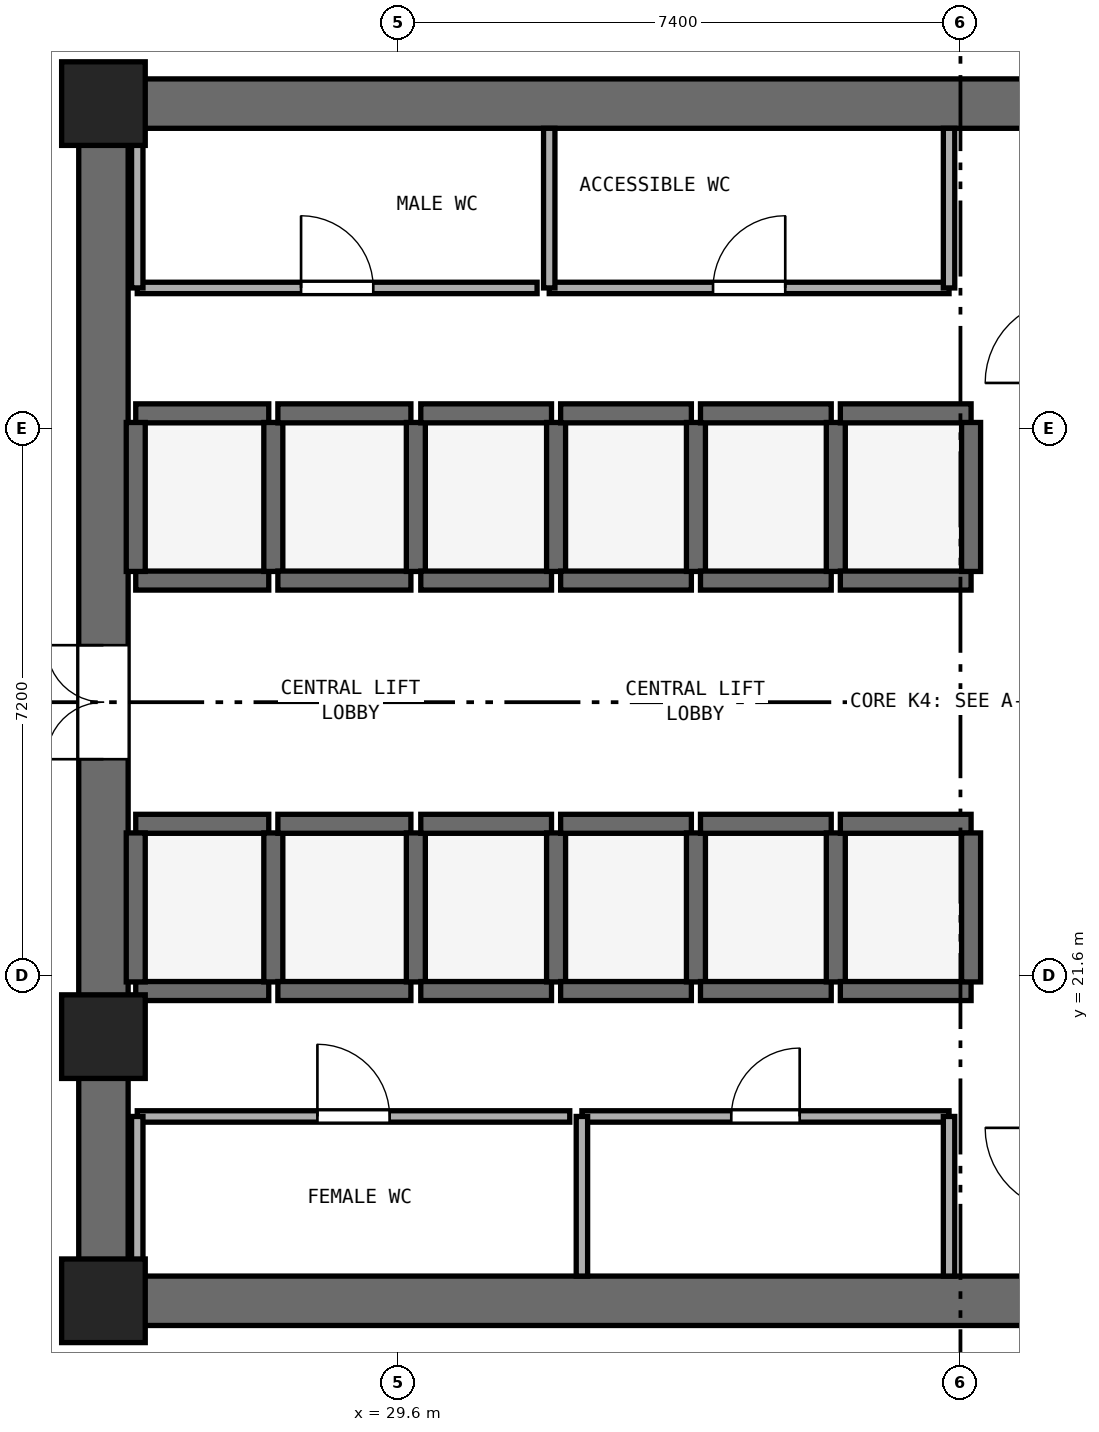
"""IFC4 building model, lengths in metres.
Left out: names, types, materials, properties, quantities, classifications, styles, units other than length and angle.
Written with IfcOpenShell. Run it as: python <this file> out.ifc"""

import sys

from ifc_helpers import new_model, si_unit, direction, frame, frame_2d, origin, origin_2d, place, context, subcontext, project, spatial, rectangle, extrude, element, fill, save


model = new_model("IFC4")
c1 = context("Model", 3, precision=1e-05, world=origin(), true_north=direction((0.0, 1.0)))
c2 = subcontext(c1, "Body", "Model", "MODEL_VIEW")
j1 = project(units=[si_unit("LENGTHUNIT", "METRE"), si_unit("PLANEANGLEUNIT", "RADIAN")], contexts=[c1])
p1 = place(None, origin())
s1 = spatial("IfcSite", under=j1, at=p1, CompositionType="ELEMENT")
p2 = place(p1, origin())
s2 = spatial("IfcBuilding", under=s1, at=p2, CompositionType="ELEMENT")
p3 = place(p2, frame((0.0, 0.0, 120.0)))
s3 = spatial("IfcBuildingStorey", under=s2, at=p3, CompositionType="ELEMENT", Elevation=120.0)
for number, where, z_axis, x_axis in (
    (1, (25.4, 17.325, 0.0), (0.0, 0.0, 1.0), (1.0, 0.0, 0.0)),
    (2, (25.4, 33.075, 0.0), (0.0, 0.0, 1.0), (1.0, 0.0, 0.0)),
):
    element("IfcWall", number, at=place(p3, frame(where, z_axis=z_axis, x_axis=x_axis)), inside=s3, PredefinedType="SHEAR", context=c2, shape_type="SweptSolid", body=[
        extrude(rectangle(XDim=23.2, YDim=0.65, at=frame_2d((11.6, 0.0))), origin(), (0.0, 0.0, 1.0), 4.6),
    ])
p4 = place(p3, frame((25.725, 17.65, 0.0), z_axis=(0.0, 0.0, 1.0), x_axis=(0.0, 1.0, 0.0)))
e3 = element("IfcWall", 3, at=p4, inside=s3, PredefinedType="SHEAR", context=c2, shape_type="SweptSolid", body=[
    extrude(rectangle(XDim=15.1, YDim=0.65, at=frame_2d((7.55, 0.0))), origin(), (0.0, 0.0, 1.0), 4.6),
])
p5 = place(p4, frame((6.8, 0.0, 0.0)))
e4 = element("IfcOpeningElement", 4, at=p5, cuts=e3, PredefinedType="OPENING", context=c2, shape_type="SweptSolid", body=[
    extrude(rectangle(XDim=1.5, YDim=2.15, at=frame_2d((0.75, 1.075))), frame((0.0, 0.335, 0.0), z_axis=(0.0, -1.0, 0.0), x_axis=(1.0, 0.0, 0.0)), (0.0, 0.0, 1.0), 0.67),
])
for number, where, z_axis, x_axis in (
    (5, (25.725, 17.325, 0.0), (0.0, 0.0, 1.0), (1.0, 0.0, 0.0)),
    (6, (25.725, 33.075, 0.0), (0.0, 0.0, 1.0), (1.0, 0.0, 0.0)),
    (7, (25.725, 20.8, 0.0), (0.0, 0.0, 1.0), (1.0, 0.0, 0.0)),
):
    element("IfcColumn", number, at=place(p3, frame(where, z_axis=z_axis, x_axis=x_axis)), inside=s3, PredefinedType="PILASTER", context=c2, shape_type="SweptSolid", body=[
        extrude(rectangle(XDim=1.1, YDim=1.1, at=origin_2d()), origin(), (0.0, 0.0, 1.0), 5.0),
    ])
for number, where, z_axis, x_axis in (
    (8, (26.15, 26.8, 0.0), (0.0, 0.0, 1.0), (1.0, 0.0, 0.0)),
    (9, (26.15, 29.0, 0.0), (0.0, 0.0, 1.0), (1.0, 0.0, 0.0)),
):
    element("IfcWall", number, at=place(p3, frame(where, z_axis=z_axis, x_axis=x_axis)), inside=s3, PredefinedType="SHEAR", context=c2, shape_type="SweptSolid", body=[
        extrude(rectangle(XDim=1.75, YDim=0.25, at=frame_2d((0.875, 0.0))), origin(), (0.0, 0.0, 1.0), 4.6),
    ])
for number, where, z_axis, x_axis in (
    (10, (26.15, 26.92, 0.0), (0.0, 0.0, 1.0), (0.0, 1.0, 0.0)),
    (11, (27.96, 26.92, 0.0), (0.0, 0.0, 1.0), (0.0, 1.0, 0.0)),
):
    element("IfcWall", number, at=place(p3, frame(where, z_axis=z_axis, x_axis=x_axis)), inside=s3, PredefinedType="SHEAR", context=c2, shape_type="SweptSolid", body=[
        extrude(rectangle(XDim=1.96, YDim=0.25, at=frame_2d((0.98, 0.0))), origin(), (0.0, 0.0, 1.0), 4.6),
    ])
for number, where, z_axis, x_axis in (
    (12, (28.02, 26.8, 0.0), (0.0, 0.0, 1.0), (1.0, 0.0, 0.0)),
    (13, (28.02, 29.0, 0.0), (0.0, 0.0, 1.0), (1.0, 0.0, 0.0)),
):
    element("IfcWall", number, at=place(p3, frame(where, z_axis=z_axis, x_axis=x_axis)), inside=s3, PredefinedType="SHEAR", context=c2, shape_type="SweptSolid", body=[
        extrude(rectangle(XDim=1.75, YDim=0.25, at=frame_2d((0.875, 0.0))), origin(), (0.0, 0.0, 1.0), 4.6),
    ])
p6 = place(p3, frame((29.835, 26.92, 0.0), z_axis=(0.0, 0.0, 1.0), x_axis=(0.0, 1.0, 0.0)))
e14 = element("IfcWall", 14, at=p6, inside=s3, PredefinedType="SHEAR", context=c2, shape_type="SweptSolid", body=[
    extrude(rectangle(XDim=1.96, YDim=0.25, at=frame_2d((0.98, 0.0))), origin(), (0.0, 0.0, 1.0), 4.6),
])
for number, where, z_axis, x_axis in (
    (15, (26.15, 21.4, 0.0), (0.0, 0.0, 1.0), (1.0, 0.0, 0.0)),
    (16, (26.15, 23.6, 0.0), (0.0, 0.0, 1.0), (1.0, 0.0, 0.0)),
):
    element("IfcWall", number, at=place(p3, frame(where, z_axis=z_axis, x_axis=x_axis)), inside=s3, PredefinedType="SHEAR", context=c2, shape_type="SweptSolid", body=[
        extrude(rectangle(XDim=1.75, YDim=0.25, at=frame_2d((0.875, 0.0))), origin(), (0.0, 0.0, 1.0), 4.6),
    ])
for number, where, z_axis, x_axis in (
    (17, (26.15, 21.52, 0.0), (0.0, 0.0, 1.0), (0.0, 1.0, 0.0)),
    (18, (27.96, 21.52, 0.0), (0.0, 0.0, 1.0), (0.0, 1.0, 0.0)),
):
    element("IfcWall", number, at=place(p3, frame(where, z_axis=z_axis, x_axis=x_axis)), inside=s3, PredefinedType="SHEAR", context=c2, shape_type="SweptSolid", body=[
        extrude(rectangle(XDim=1.96, YDim=0.25, at=frame_2d((0.98, 0.0))), origin(), (0.0, 0.0, 1.0), 4.6),
    ])
for number, where, z_axis, x_axis in (
    (19, (28.02, 21.4, 0.0), (0.0, 0.0, 1.0), (1.0, 0.0, 0.0)),
    (20, (28.02, 23.6, 0.0), (0.0, 0.0, 1.0), (1.0, 0.0, 0.0)),
):
    element("IfcWall", number, at=place(p3, frame(where, z_axis=z_axis, x_axis=x_axis)), inside=s3, PredefinedType="SHEAR", context=c2, shape_type="SweptSolid", body=[
        extrude(rectangle(XDim=1.75, YDim=0.25, at=frame_2d((0.875, 0.0))), origin(), (0.0, 0.0, 1.0), 4.6),
    ])
p7 = place(p3, frame((29.835, 21.52, 0.0), z_axis=(0.0, 0.0, 1.0), x_axis=(0.0, 1.0, 0.0)))
e21 = element("IfcWall", 21, at=p7, inside=s3, PredefinedType="SHEAR", context=c2, shape_type="SweptSolid", body=[
    extrude(rectangle(XDim=1.96, YDim=0.25, at=frame_2d((0.98, 0.0))), origin(), (0.0, 0.0, 1.0), 4.6),
])
for number, where, z_axis, x_axis in (
    (22, (29.9, 21.4, 0.0), (0.0, 0.0, 1.0), (1.0, 0.0, 0.0)),
    (23, (29.9, 23.6, 0.0), (0.0, 0.0, 1.0), (1.0, 0.0, 0.0)),
):
    element("IfcWall", number, at=place(p3, frame(where, z_axis=z_axis, x_axis=x_axis)), inside=s3, PredefinedType="SHEAR", context=c2, shape_type="SweptSolid", body=[
        extrude(rectangle(XDim=1.72, YDim=0.25, at=frame_2d((0.86, 0.0))), origin(), (0.0, 0.0, 1.0), 4.6),
    ])
p8 = place(p3, frame((31.68, 21.52, 0.0), z_axis=(0.0, 0.0, 1.0), x_axis=(0.0, 1.0, 0.0)))
e24 = element("IfcWall", 24, at=p8, inside=s3, PredefinedType="SHEAR", context=c2, shape_type="SweptSolid", body=[
    extrude(rectangle(XDim=1.96, YDim=0.25, at=frame_2d((0.98, 0.0))), origin(), (0.0, 0.0, 1.0), 4.6),
])
for number, where, z_axis, x_axis in (
    (25, (31.74, 21.4, 0.0), (0.0, 0.0, 1.0), (1.0, 0.0, 0.0)),
    (26, (31.74, 23.6, 0.0), (0.0, 0.0, 1.0), (1.0, 0.0, 0.0)),
):
    element("IfcWall", number, at=place(p3, frame(where, z_axis=z_axis, x_axis=x_axis)), inside=s3, PredefinedType="SHEAR", context=c2, shape_type="SweptSolid", body=[
        extrude(rectangle(XDim=1.72, YDim=0.25, at=frame_2d((0.86, 0.0))), origin(), (0.0, 0.0, 1.0), 4.6),
    ])
p9 = place(p3, frame((33.52, 21.52, 0.0), z_axis=(0.0, 0.0, 1.0), x_axis=(0.0, 1.0, 0.0)))
e27 = element("IfcWall", 27, at=p9, inside=s3, PredefinedType="SHEAR", context=c2, shape_type="SweptSolid", body=[
    extrude(rectangle(XDim=1.96, YDim=0.25, at=frame_2d((0.98, 0.0))), origin(), (0.0, 0.0, 1.0), 4.6),
])
for number, where, z_axis, x_axis in (
    (28, (33.58, 21.4, 0.0), (0.0, 0.0, 1.0), (1.0, 0.0, 0.0)),
    (29, (33.58, 23.6, 0.0), (0.0, 0.0, 1.0), (1.0, 0.0, 0.0)),
):
    element("IfcWall", number, at=place(p3, frame(where, z_axis=z_axis, x_axis=x_axis)), inside=s3, PredefinedType="SHEAR", context=c2, shape_type="SweptSolid", body=[
        extrude(rectangle(XDim=1.72, YDim=0.25, at=frame_2d((0.86, 0.0))), origin(), (0.0, 0.0, 1.0), 4.6),
    ])
p10 = place(p3, frame((35.36, 21.52, 0.0), z_axis=(0.0, 0.0, 1.0), x_axis=(0.0, 1.0, 0.0)))
e30 = element("IfcWall", 30, at=p10, inside=s3, PredefinedType="SHEAR", context=c2, shape_type="SweptSolid", body=[
    extrude(rectangle(XDim=1.96, YDim=0.25, at=frame_2d((0.98, 0.0))), origin(), (0.0, 0.0, 1.0), 4.6),
])
for number, where, z_axis, x_axis in (
    (31, (35.42, 21.4, 0.0), (0.0, 0.0, 1.0), (1.0, 0.0, 0.0)),
    (32, (35.42, 23.6, 0.0), (0.0, 0.0, 1.0), (1.0, 0.0, 0.0)),
):
    element("IfcWall", number, at=place(p3, frame(where, z_axis=z_axis, x_axis=x_axis)), inside=s3, PredefinedType="SHEAR", context=c2, shape_type="SweptSolid", body=[
        extrude(rectangle(XDim=1.72, YDim=0.25, at=frame_2d((0.86, 0.0))), origin(), (0.0, 0.0, 1.0), 4.6),
    ])
p11 = place(p3, frame((37.14, 21.52, 0.0), z_axis=(0.0, 0.0, 1.0), x_axis=(0.0, 1.0, 0.0)))
e33 = element("IfcWall", 33, at=p11, inside=s3, PredefinedType="SHEAR", context=c2, shape_type="SweptSolid", body=[
    extrude(rectangle(XDim=1.96, YDim=0.25, at=frame_2d((0.98, 0.0))), origin(), (0.0, 0.0, 1.0), 4.6),
])
for number, where, z_axis, x_axis in (
    (34, (29.9, 26.8, 0.0), (0.0, 0.0, 1.0), (1.0, 0.0, 0.0)),
    (35, (29.9, 29.0, 0.0), (0.0, 0.0, 1.0), (1.0, 0.0, 0.0)),
):
    element("IfcWall", number, at=place(p3, frame(where, z_axis=z_axis, x_axis=x_axis)), inside=s3, PredefinedType="SHEAR", context=c2, shape_type="SweptSolid", body=[
        extrude(rectangle(XDim=1.72, YDim=0.25, at=frame_2d((0.86, 0.0))), origin(), (0.0, 0.0, 1.0), 4.6),
    ])
p12 = place(p3, frame((31.68, 26.92, 0.0), z_axis=(0.0, 0.0, 1.0), x_axis=(0.0, 1.0, 0.0)))
e36 = element("IfcWall", 36, at=p12, inside=s3, PredefinedType="SHEAR", context=c2, shape_type="SweptSolid", body=[
    extrude(rectangle(XDim=1.96, YDim=0.25, at=frame_2d((0.98, 0.0))), origin(), (0.0, 0.0, 1.0), 4.6),
])
for number, where, z_axis, x_axis in (
    (37, (31.74, 26.8, 0.0), (0.0, 0.0, 1.0), (1.0, 0.0, 0.0)),
    (38, (31.74, 29.0, 0.0), (0.0, 0.0, 1.0), (1.0, 0.0, 0.0)),
):
    element("IfcWall", number, at=place(p3, frame(where, z_axis=z_axis, x_axis=x_axis)), inside=s3, PredefinedType="SHEAR", context=c2, shape_type="SweptSolid", body=[
        extrude(rectangle(XDim=1.72, YDim=0.25, at=frame_2d((0.86, 0.0))), origin(), (0.0, 0.0, 1.0), 4.6),
    ])
p13 = place(p3, frame((33.52, 26.92, 0.0), z_axis=(0.0, 0.0, 1.0), x_axis=(0.0, 1.0, 0.0)))
e39 = element("IfcWall", 39, at=p13, inside=s3, PredefinedType="SHEAR", context=c2, shape_type="SweptSolid", body=[
    extrude(rectangle(XDim=1.96, YDim=0.25, at=frame_2d((0.98, 0.0))), origin(), (0.0, 0.0, 1.0), 4.6),
])
for number, where, z_axis, x_axis in (
    (40, (33.58, 26.8, 0.0), (0.0, 0.0, 1.0), (1.0, 0.0, 0.0)),
    (41, (33.58, 29.0, 0.0), (0.0, 0.0, 1.0), (1.0, 0.0, 0.0)),
):
    element("IfcWall", number, at=place(p3, frame(where, z_axis=z_axis, x_axis=x_axis)), inside=s3, PredefinedType="SHEAR", context=c2, shape_type="SweptSolid", body=[
        extrude(rectangle(XDim=1.72, YDim=0.25, at=frame_2d((0.86, 0.0))), origin(), (0.0, 0.0, 1.0), 4.6),
    ])
p14 = place(p3, frame((35.36, 26.92, 0.0), z_axis=(0.0, 0.0, 1.0), x_axis=(0.0, 1.0, 0.0)))
e42 = element("IfcWall", 42, at=p14, inside=s3, PredefinedType="SHEAR", context=c2, shape_type="SweptSolid", body=[
    extrude(rectangle(XDim=1.96, YDim=0.25, at=frame_2d((0.98, 0.0))), origin(), (0.0, 0.0, 1.0), 4.6),
])
for number, where, z_axis, x_axis in (
    (43, (35.42, 26.8, 0.0), (0.0, 0.0, 1.0), (1.0, 0.0, 0.0)),
    (44, (35.42, 29.0, 0.0), (0.0, 0.0, 1.0), (1.0, 0.0, 0.0)),
):
    element("IfcWall", number, at=place(p3, frame(where, z_axis=z_axis, x_axis=x_axis)), inside=s3, PredefinedType="SHEAR", context=c2, shape_type="SweptSolid", body=[
        extrude(rectangle(XDim=1.72, YDim=0.25, at=frame_2d((0.86, 0.0))), origin(), (0.0, 0.0, 1.0), 4.6),
    ])
p15 = place(p3, frame((37.14, 26.92, 0.0), z_axis=(0.0, 0.0, 1.0), x_axis=(0.0, 1.0, 0.0)))
e45 = element("IfcWall", 45, at=p15, inside=s3, PredefinedType="SHEAR", context=c2, shape_type="SweptSolid", body=[
    extrude(rectangle(XDim=1.96, YDim=0.25, at=frame_2d((0.98, 0.0))), origin(), (0.0, 0.0, 1.0), 4.6),
])
p16 = place(p3, frame((26.17, 30.65, 0.0), z_axis=(0.0, 0.0, 1.0), x_axis=(1.0, 0.0, 0.0)))
e46 = element("IfcWall", 46, at=p16, inside=s3, PredefinedType="PARTITIONING", context=c2, shape_type="SweptSolid", body=[
    extrude(rectangle(XDim=5.26, YDim=0.15, at=frame_2d((2.63, 0.0))), origin(), (0.0, 0.0, 1.0), 4.6),
])
p17 = place(p16, frame((2.155, 0.0, 0.0)))
e47 = element("IfcOpeningElement", 47, at=p17, cuts=e46, PredefinedType="OPENING", context=c2, shape_type="SweptSolid", body=[
    extrude(rectangle(XDim=0.95, YDim=2.1, at=frame_2d((0.475, 1.05))), frame((0.0, 0.085, 0.0), z_axis=(0.0, -1.0, 0.0), x_axis=(1.0, 0.0, 0.0)), (0.0, 0.0, 1.0), 0.17),
])
p18 = place(p3, frame((26.17, 30.65, 0.0), z_axis=(0.0, 0.0, 1.0), x_axis=(0.0, 1.0, 0.0)))
e48 = element("IfcWall", 48, at=p18, inside=s3, PredefinedType="PARTITIONING", context=c2, shape_type="SweptSolid", body=[
    extrude(rectangle(XDim=2.1, YDim=0.15, at=frame_2d((1.05, 0.0))), origin(), (0.0, 0.0, 1.0), 4.6),
])
p19 = place(p3, frame((31.59, 30.65, 0.0), z_axis=(0.0, 0.0, 1.0), x_axis=(1.0, 0.0, 0.0)))
e49 = element("IfcWall", 49, at=p19, inside=s3, PredefinedType="PARTITIONING", context=c2, shape_type="SweptSolid", body=[
    extrude(rectangle(XDim=5.26, YDim=0.15, at=frame_2d((2.63, 0.0))), origin(), (0.0, 0.0, 1.0), 4.6),
])
p20 = place(p19, frame((2.155, 0.0, 0.0)))
e50 = element("IfcOpeningElement", 50, at=p20, cuts=e49, PredefinedType="OPENING", context=c2, shape_type="SweptSolid", body=[
    extrude(rectangle(XDim=0.95, YDim=2.1, at=frame_2d((0.475, 1.05))), frame((0.0, 0.085, 0.0), z_axis=(0.0, -1.0, 0.0), x_axis=(1.0, 0.0, 0.0)), (0.0, 0.0, 1.0), 0.17),
])
for number, where, z_axis, x_axis in (
    (51, (31.59, 30.65, 0.0), (0.0, 0.0, 1.0), (0.0, 1.0, 0.0)),
    (52, (36.85, 30.65, 0.0), (0.0, 0.0, 1.0), (0.0, 1.0, 0.0)),
):
    element("IfcWall", number, at=place(p3, frame(where, z_axis=z_axis, x_axis=x_axis)), inside=s3, PredefinedType="PARTITIONING", context=c2, shape_type="SweptSolid", body=[
        extrude(rectangle(XDim=2.1, YDim=0.15, at=frame_2d((1.05, 0.0))), origin(), (0.0, 0.0, 1.0), 4.6),
    ])
p21 = place(p3, frame((26.17, 19.75, 0.0), z_axis=(0.0, 0.0, 1.0), x_axis=(1.0, 0.0, 0.0)))
e53 = element("IfcWall", 53, at=p21, inside=s3, PredefinedType="PARTITIONING", context=c2, shape_type="SweptSolid", body=[
    extrude(rectangle(XDim=5.69, YDim=0.15, at=frame_2d((2.845, 0.0))), origin(), (0.0, 0.0, 1.0), 4.6),
])
p22 = place(p21, frame((2.37, 0.0, 0.0)))
e54 = element("IfcOpeningElement", 54, at=p22, cuts=e53, PredefinedType="OPENING", context=c2, shape_type="SweptSolid", body=[
    extrude(rectangle(XDim=0.95, YDim=2.1, at=frame_2d((0.475, 1.05))), frame((0.0, 0.085, 0.0), z_axis=(0.0, -1.0, 0.0), x_axis=(1.0, 0.0, 0.0)), (0.0, 0.0, 1.0), 0.17),
])
p23 = place(p3, frame((26.17, 17.65, 0.0), z_axis=(0.0, 0.0, 1.0), x_axis=(0.0, 1.0, 0.0)))
e55 = element("IfcWall", 55, at=p23, inside=s3, PredefinedType="PARTITIONING", context=c2, shape_type="SweptSolid", body=[
    extrude(rectangle(XDim=2.1, YDim=0.15, at=frame_2d((1.05, 0.0))), origin(), (0.0, 0.0, 1.0), 4.6),
])
p24 = place(p3, frame((32.02, 19.75, 0.0), z_axis=(0.0, 0.0, 1.0), x_axis=(1.0, 0.0, 0.0)))
e56 = element("IfcWall", 56, at=p24, inside=s3, PredefinedType="PARTITIONING", context=c2, shape_type="SweptSolid", body=[
    extrude(rectangle(XDim=4.83, YDim=0.15, at=frame_2d((2.415, 0.0))), origin(), (0.0, 0.0, 1.0), 4.6),
])
p25 = place(p24, frame((1.965, 0.0, 0.0)))
e57 = element("IfcOpeningElement", 57, at=p25, cuts=e56, PredefinedType="OPENING", context=c2, shape_type="SweptSolid", body=[
    extrude(rectangle(XDim=0.9, YDim=2.1, at=frame_2d((0.45, 1.05))), frame((0.0, 0.085, 0.0), z_axis=(0.0, -1.0, 0.0), x_axis=(1.0, 0.0, 0.0)), (0.0, 0.0, 1.0), 0.17),
])
for number, where, z_axis, x_axis in (
    (58, (32.02, 17.65, 0.0), (0.0, 0.0, 1.0), (0.0, 1.0, 0.0)),
    (59, (36.85, 17.65, 0.0), (0.0, 0.0, 1.0), (0.0, 1.0, 0.0)),
):
    element("IfcWall", number, at=place(p3, frame(where, z_axis=z_axis, x_axis=x_axis)), inside=s3, PredefinedType="PARTITIONING", context=c2, shape_type="SweptSolid", body=[
        extrude(rectangle(XDim=2.1, YDim=0.15, at=frame_2d((1.05, 0.0))), origin(), (0.0, 0.0, 1.0), 4.6),
    ])
p26 = place(p5, origin())
e60 = element("IfcDoor", 60, at=p26, inside=s3, OperationType="DOUBLE_DOOR_SINGLE_SWING", PredefinedType="DOOR", context=c2, shape_type="SweptSolid", body=[
    extrude(rectangle(XDim=1.5, YDim=2.15, at=frame_2d((0.75, 1.075))), frame((0.0, 0.025, 0.0), z_axis=(0.0, -1.0, 0.0), x_axis=(1.0, 0.0, 0.0)), (0.0, 0.0, 1.0), 0.05),
])
fill(e4, e60)
p27 = place(p17, origin())
e61 = element("IfcDoor", 61, at=p27, inside=s3, OperationType="SINGLE_SWING_LEFT", PredefinedType="DOOR", context=c2, shape_type="SweptSolid", body=[
    extrude(rectangle(XDim=0.95, YDim=2.1, at=frame_2d((0.475, 1.05))), frame((0.0, 0.025, 0.0), z_axis=(0.0, -1.0, 0.0), x_axis=(1.0, 0.0, 0.0)), (0.0, 0.0, 1.0), 0.05),
])
fill(e47, e61)
p28 = place(p20, origin())
e62 = element("IfcDoor", 62, at=p28, inside=s3, OperationType="SINGLE_SWING_RIGHT", PredefinedType="DOOR", context=c2, shape_type="SweptSolid", body=[
    extrude(rectangle(XDim=0.95, YDim=2.1, at=frame_2d((0.475, 1.05))), frame((0.0, 0.025, 0.0), z_axis=(0.0, -1.0, 0.0), x_axis=(1.0, 0.0, 0.0)), (0.0, 0.0, 1.0), 0.05),
])
fill(e50, e62)
p29 = place(p22, origin())
e63 = element("IfcDoor", 63, at=p29, inside=s3, OperationType="SINGLE_SWING_LEFT", PredefinedType="DOOR", context=c2, shape_type="SweptSolid", body=[
    extrude(rectangle(XDim=0.95, YDim=2.1, at=frame_2d((0.475, 1.05))), frame((0.0, 0.025, 0.0), z_axis=(0.0, -1.0, 0.0), x_axis=(1.0, 0.0, 0.0)), (0.0, 0.0, 1.0), 0.05),
])
fill(e54, e63)
p30 = place(p25, origin())
e64 = element("IfcDoor", 64, at=p30, inside=s3, OperationType="SINGLE_SWING_RIGHT", PredefinedType="DOOR", context=c2, shape_type="SweptSolid", body=[
    extrude(rectangle(XDim=0.9, YDim=2.1, at=frame_2d((0.45, 1.05))), frame((0.0, 0.025, 0.0), z_axis=(0.0, -1.0, 0.0), x_axis=(1.0, 0.0, 0.0)), (0.0, 0.0, 1.0), 0.05),
])
fill(e57, e64)
save(model, sys.argv[1])
